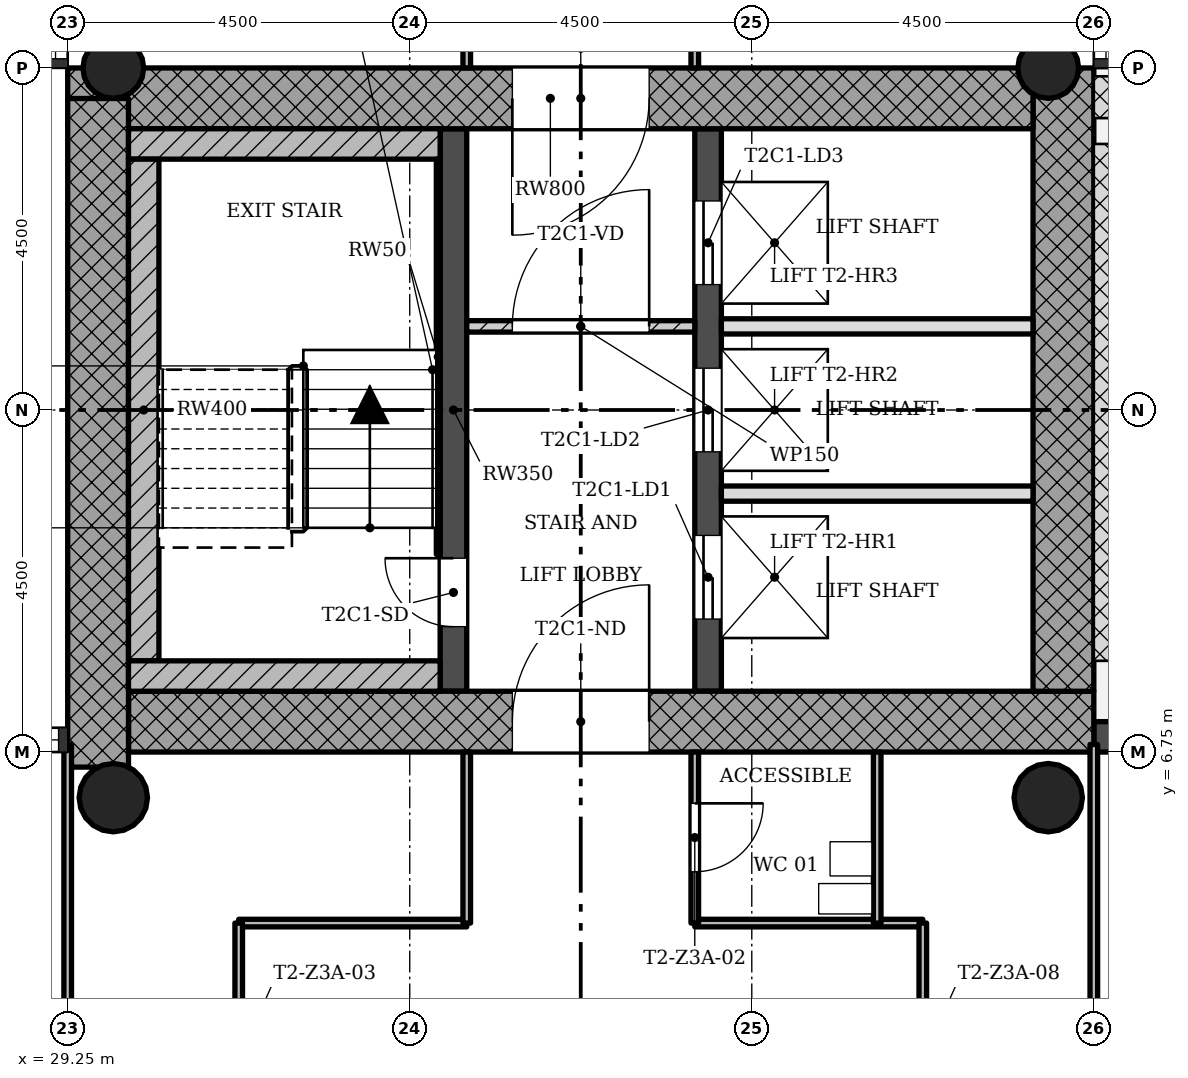
"""IFC4 building model, lengths in metres.
Left out: names, types, materials, properties, quantities, classifications, styles, units other than length and angle.
Written with IfcOpenShell. Run it as: python <this file> out.ifc"""

import sys

from ifc_helpers import new_model, si_unit, direction, frame, frame_2d, origin, origin_2d, place, context, subcontext, project, spatial, rectangle, hollow_circle, extrude, element, fill, save


model = new_model("IFC4")
c1 = context("Model", 3, precision=1e-05, world=origin(), true_north=direction((0.0, 1.0)))
c2 = subcontext(c1, "Body", "Model", "MODEL_VIEW")
j1 = project(units=[si_unit("LENGTHUNIT", "METRE"), si_unit("PLANEANGLEUNIT", "RADIAN")], contexts=[c1])
p1 = place(None, origin())
s1 = spatial("IfcSite", under=j1, at=p1, CompositionType="ELEMENT")
p2 = place(p1, origin())
s2 = spatial("IfcBuilding", under=s1, at=p2, CompositionType="ELEMENT")
p3 = place(p2, frame((0.0, 0.0, 133.7)))
s3 = spatial("IfcBuildingStorey", under=s2, at=p3, CompositionType="ELEMENT", Elevation=133.7)
p4 = place(p3, frame((30.05, 7.15, 0.0), z_axis=(0.0, 0.0, 1.0), x_axis=(1.0, 0.0, 0.0)))
e1 = element("IfcWall", 1, at=p4, inside=s3, PredefinedType="SHEAR", context=c2, shape_type="SweptSolid", body=[
    extrude(rectangle(XDim=12.7, YDim=0.8, at=frame_2d((6.35, 0.0))), origin(), (0.0, 0.0, 1.0), 3.4),
])
p5 = place(p4, frame((5.05, 0.0, 0.0)))
e2 = element("IfcOpeningElement", 2, at=p5, cuts=e1, PredefinedType="OPENING", context=c2, shape_type="SweptSolid", body=[
    extrude(rectangle(XDim=1.8, YDim=2.1, at=frame_2d((0.9, 1.05))), frame((0.0, 0.41, 0.0), z_axis=(0.0, -1.0, 0.0), x_axis=(1.0, 0.0, 0.0)), (0.0, 0.0, 1.0), 0.82),
])
p6 = place(p3, frame((42.35, 7.55, 0.0), z_axis=(0.0, 0.0, 1.0), x_axis=(0.0, 1.0, 0.0)))
e3 = element("IfcWall", 3, at=p6, inside=s3, PredefinedType="SHEAR", context=c2, shape_type="SweptSolid", body=[
    extrude(rectangle(XDim=8.2, YDim=0.8, at=frame_2d((4.1, 0.0))), origin(), (0.0, 0.0, 1.0), 3.4),
])
p7 = place(p3, frame((41.95, 15.35, 0.0), z_axis=(0.0, 0.0, 1.0), x_axis=(-1.0, 0.0, 0.0)))
e4 = element("IfcWall", 4, at=p7, inside=s3, PredefinedType="SHEAR", context=c2, shape_type="SweptSolid", body=[
    extrude(rectangle(XDim=12.7, YDim=0.8, at=frame_2d((6.35, 0.0))), origin(), (0.0, 0.0, 1.0), 3.4),
])
p8 = place(p7, frame((5.05, 0.0, 0.0)))
e5 = element("IfcOpeningElement", 5, at=p8, cuts=e4, PredefinedType="OPENING", context=c2, shape_type="SweptSolid", body=[
    extrude(rectangle(XDim=1.8, YDim=2.1, at=frame_2d((0.9, 1.05))), frame((0.0, 0.41, 0.0), z_axis=(0.0, -1.0, 0.0), x_axis=(1.0, 0.0, 0.0)), (0.0, 0.0, 1.0), 0.82),
])
p9 = place(p3, frame((29.65, 15.348, 0.0), z_axis=(0.0, 0.0, 1.0), x_axis=(0.0, -1.0, 0.0)))
e6 = element("IfcWall", 6, at=p9, inside=s3, PredefinedType="SHEAR", context=c2, shape_type="SweptSolid", body=[
    extrude(rectangle(XDim=8.796, YDim=0.8, at=frame_2d((4.398, 0.0))), origin(), (0.0, 0.0, 1.0), 3.4),
])
p10 = place(p3, frame((34.325, 7.55, 0.0), z_axis=(0.0, 0.0, 1.0), x_axis=(0.0, 1.0, 0.0)))
e7 = element("IfcWall", 7, at=p10, inside=s3, PredefinedType="SHEAR", context=c2, shape_type="SweptSolid", body=[
    extrude(rectangle(XDim=7.4, YDim=0.35, at=frame_2d((3.7, 0.0))), origin(), (0.0, 0.0, 1.0), 3.4),
])
p11 = place(p10, frame((0.85, 0.0, 0.0)))
e8 = element("IfcOpeningElement", 8, at=p11, cuts=e7, PredefinedType="OPENING", context=c2, shape_type="SweptSolid", body=[
    extrude(rectangle(XDim=0.9, YDim=2.1, at=frame_2d((0.45, 1.05))), frame((0.0, 0.185, 0.0), z_axis=(0.0, -1.0, 0.0), x_axis=(1.0, 0.0, 0.0)), (0.0, 0.0, 1.0), 0.37),
])
p12 = place(p3, frame((37.675, 7.55, 0.0), z_axis=(0.0, 0.0, 1.0), x_axis=(0.0, 1.0, 0.0)))
e9 = element("IfcWall", 9, at=p12, inside=s3, PredefinedType="SHEAR", context=c2, shape_type="SweptSolid", body=[
    extrude(rectangle(XDim=7.4, YDim=0.35, at=frame_2d((3.7, 0.0))), origin(), (0.0, 0.0, 1.0), 3.4),
])
p13 = place(p12, frame((0.95, 0.0, 0.0)))
e10 = element("IfcOpeningElement", 10, at=p13, cuts=e9, PredefinedType="OPENING", context=c2, shape_type="SweptSolid", body=[
    extrude(rectangle(XDim=1.1, YDim=2.1, at=frame_2d((0.55, 1.05))), frame((0.0, 0.185, 0.0), z_axis=(0.0, -1.0, 0.0), x_axis=(1.0, 0.0, 0.0)), (0.0, 0.0, 1.0), 0.37),
])
p14 = place(p12, frame((3.15, 0.0, 0.0)))
e11 = element("IfcOpeningElement", 11, at=p14, cuts=e9, PredefinedType="OPENING", context=c2, shape_type="SweptSolid", body=[
    extrude(rectangle(XDim=1.1, YDim=2.1, at=frame_2d((0.55, 1.05))), frame((0.0, 0.185, 0.0), z_axis=(0.0, -1.0, 0.0), x_axis=(1.0, 0.0, 0.0)), (0.0, 0.0, 1.0), 0.37),
])
p15 = place(p12, frame((5.35, 0.0, 0.0)))
e12 = element("IfcOpeningElement", 12, at=p15, cuts=e9, PredefinedType="OPENING", context=c2, shape_type="SweptSolid", body=[
    extrude(rectangle(XDim=1.1, YDim=2.1, at=frame_2d((0.55, 1.05))), frame((0.0, 0.185, 0.0), z_axis=(0.0, -1.0, 0.0), x_axis=(1.0, 0.0, 0.0)), (0.0, 0.0, 1.0), 0.37),
])
for number, where, z_axis, x_axis in (
    (13, (42.15, 15.75, 0.0), (0.0, 0.0, 1.0), (1.0, 0.0, 0.0)),
    (14, (29.85, 15.75, 0.0), (0.0, 0.0, 1.0), (1.0, 0.0, 0.0)),
):
    element("IfcColumn", number, at=place(p3, frame(where, z_axis=z_axis, x_axis=x_axis)), inside=s3, PredefinedType="COLUMN", context=c2, shape_type="SweptSolid", body=[
        extrude(hollow_circle(Radius=0.4, WallThickness=0.028, at=origin_2d()), origin(), (0.0, 0.0, 1.0), 3.4),
    ])
for number, where, z_axis, x_axis in (
    (15, (42.15, 6.15, 0.0), (0.0, 0.0, 1.0), (1.0, 0.0, 0.0)),
    (16, (29.85, 6.15, 0.0), (0.0, 0.0, 1.0), (1.0, 0.0, 0.0)),
):
    element("IfcColumn", number, at=place(p3, frame(where, z_axis=z_axis, x_axis=x_axis)), inside=s3, PredefinedType="COLUMN", context=c2, shape_type="SweptSolid", body=[
        extrude(hollow_circle(Radius=0.45, WallThickness=0.032, at=origin_2d()), origin(), (0.0, 0.0, 1.0), 3.4),
    ])
p16 = place(p3, frame((47.25, 6.95, -0.02), z_axis=(0.0, 0.0, 1.0), x_axis=(-1.0, 0.0, 0.0)))
e17 = element("IfcWall", 17, at=p16, inside=s3, PredefinedType="STANDARD", context=c2, shape_type="SweptSolid", body=[
    extrude(rectangle(XDim=4.5, YDim=0.4, at=frame_2d((2.25, 0.0))), origin(), (0.0, 0.0, 1.0), 3.12),
])
p17 = place(p16, frame((1.35, 0.0, 0.02)))
e18 = element("IfcOpeningElement", 18, at=p17, cuts=e17, PredefinedType="OPENING", context=c2, shape_type="SweptSolid", body=[
    extrude(rectangle(XDim=1.8, YDim=2.1, at=frame_2d((0.9, 1.05))), frame((0.0, 0.21, 0.0), z_axis=(0.0, -1.0, 0.0), x_axis=(1.0, 0.0, 0.0)), (0.0, 0.0, 1.0), 0.42),
])
p18 = place(p3, frame((37.5, 12.35, 0.0), z_axis=(0.0, 0.0, 1.0), x_axis=(-1.0, 0.0, 0.0)))
e19 = element("IfcWall", 19, at=p18, inside=s3, PredefinedType="PARTITIONING", context=c2, shape_type="SweptSolid", body=[
    extrude(rectangle(XDim=3.0, YDim=0.15, at=frame_2d((1.5, 0.0))), origin(), (0.0, 0.0, 1.0), 3.0),
])
p19 = place(p18, frame((0.6, 0.0, 0.0)))
e20 = element("IfcOpeningElement", 20, at=p19, cuts=e19, PredefinedType="OPENING", context=c2, shape_type="SweptSolid", body=[
    extrude(rectangle(XDim=1.8, YDim=2.1, at=frame_2d((0.9, 1.05))), frame((0.0, 0.085, 0.0), z_axis=(0.0, -1.0, 0.0), x_axis=(1.0, 0.0, 0.0)), (0.0, 0.0, 1.0), 0.17),
])
for number, where, z_axis, x_axis in (
    (21, (41.95, 10.15, 0.0), (0.0, 0.0, 1.0), (-1.0, 0.0, 0.0)),
    (22, (41.95, 12.35, 0.0), (0.0, 0.0, 1.0), (-1.0, 0.0, 0.0)),
):
    element("IfcWall", number, at=place(p3, frame(where, z_axis=z_axis, x_axis=x_axis)), inside=s3, PredefinedType="SOLIDWALL", context=c2, shape_type="SweptSolid", body=[
        extrude(rectangle(XDim=4.1, YDim=0.2, at=frame_2d((2.05, 0.0))), origin(), (0.0, 0.0, 1.0), 3.0),
    ])
for number, where, z_axis, x_axis in (
    (23, (40.5, 4.5, 0.0), (0.0, 0.0, 1.0), (-1.0, 0.0, 0.0)),
    (24, (34.5, 4.5, 0.0), (0.0, 0.0, 1.0), (-1.0, 0.0, 0.0)),
):
    element("IfcWall", number, at=place(p3, frame(where, z_axis=z_axis, x_axis=x_axis)), inside=s3, PredefinedType="PARTITIONING", context=c2, shape_type="SweptSolid", body=[
        extrude(rectangle(XDim=3.0, YDim=0.1, at=frame_2d((1.5, 0.0))), origin(), (0.0, 0.0, 1.0), 3.0),
    ])
p20 = place(p3, frame((42.75, 0.9, 0.0), z_axis=(0.0, 0.0, 1.0), x_axis=(0.0, 1.0, 0.0)))
e25 = element("IfcWall", 25, at=p20, inside=s3, PredefinedType="PARTITIONING", context=c2, shape_type="SweptSolid", body=[
    extrude(rectangle(XDim=5.95, YDim=0.1, at=frame_2d((2.975, 0.0))), origin(), (0.0, 0.0, 1.0), 3.0),
])
p21 = place(p3, frame((40.5, 0.9, 0.0), z_axis=(0.0, 0.0, 1.0), x_axis=(0.0, 1.0, 0.0)))
e26 = element("IfcWall", 26, at=p21, inside=s3, PredefinedType="PARTITIONING", context=c2, shape_type="SweptSolid", body=[
    extrude(rectangle(XDim=3.6, YDim=0.1, at=frame_2d((1.8, 0.0))), origin(), (0.0, 0.0, 1.0), 3.0),
])
p22 = place(p21, frame((1.35, 0.0, 0.0)))
e27 = element("IfcOpeningElement", 27, at=p22, cuts=e26, PredefinedType="OPENING", context=c2, shape_type="SweptSolid", body=[
    extrude(rectangle(XDim=0.9, YDim=2.1, at=frame_2d((0.45, 1.05))), frame((0.0, 0.06, 0.0), z_axis=(0.0, -1.0, 0.0), x_axis=(1.0, 0.0, 0.0)), (0.0, 0.0, 1.0), 0.12),
])
p23 = place(p3, frame((39.9, 4.5, 0.0), z_axis=(0.0, 0.0, 1.0), x_axis=(0.0, 1.0, 0.0)))
e28 = element("IfcWall", 28, at=p23, inside=s3, PredefinedType="PARTITIONING", context=c2, shape_type="SweptSolid", body=[
    extrude(rectangle(XDim=2.25, YDim=0.1, at=frame_2d((1.125, 0.0))), origin(), (0.0, 0.0, 1.0), 3.0),
])
p24 = place(p3, frame((37.5, 4.5, 0.0), z_axis=(0.0, 0.0, 1.0), x_axis=(0.0, 1.0, 0.0)))
e29 = element("IfcWall", 29, at=p24, inside=s3, PredefinedType="PARTITIONING", context=c2, shape_type="SweptSolid", body=[
    extrude(rectangle(XDim=2.25, YDim=0.1, at=frame_2d((1.125, 0.0))), origin(), (0.0, 0.0, 1.0), 3.0),
])
p25 = place(p24, frame((0.675, 0.0, 0.0)))
e30 = element("IfcOpeningElement", 30, at=p25, cuts=e29, PredefinedType="OPENING", context=c2, shape_type="SweptSolid", body=[
    extrude(rectangle(XDim=0.9, YDim=2.1, at=frame_2d((0.45, 1.05))), frame((0.0, 0.06, 0.0), z_axis=(0.0, -1.0, 0.0), x_axis=(1.0, 0.0, 0.0)), (0.0, 0.0, 1.0), 0.12),
])
p26 = place(p3, frame((37.5, 15.75, 0.0), z_axis=(0.0, 0.0, 1.0), x_axis=(0.0, 1.0, 0.0)))
e31 = element("IfcWall", 31, at=p26, inside=s3, PredefinedType="PARTITIONING", context=c2, shape_type="SweptSolid", body=[
    extrude(rectangle(XDim=4.5, YDim=0.1, at=frame_2d((2.25, 0.0))), origin(), (0.0, 0.0, 1.0), 3.0),
])
p27 = place(p26, frame((1.8, 0.0, 0.0)))
e32 = element("IfcOpeningElement", 32, at=p27, cuts=e31, PredefinedType="OPENING", context=c2, shape_type="SweptSolid", body=[
    extrude(rectangle(XDim=0.9, YDim=2.1, at=frame_2d((0.45, 1.05))), frame((0.0, 0.06, 0.0), z_axis=(0.0, -1.0, 0.0), x_axis=(1.0, 0.0, 0.0)), (0.0, 0.0, 1.0), 0.12),
])
p28 = place(p3, frame((34.5, 4.5, 0.0), z_axis=(0.0, 0.0, 1.0), x_axis=(0.0, 1.0, 0.0)))
e33 = element("IfcWall", 33, at=p28, inside=s3, PredefinedType="PARTITIONING", context=c2, shape_type="SweptSolid", body=[
    extrude(rectangle(XDim=2.25, YDim=0.1, at=frame_2d((1.125, 0.0))), origin(), (0.0, 0.0, 1.0), 3.0),
])
p29 = place(p3, frame((34.5, 15.75, 0.0), z_axis=(0.0, 0.0, 1.0), x_axis=(0.0, 1.0, 0.0)))
e34 = element("IfcWall", 34, at=p29, inside=s3, PredefinedType="PARTITIONING", context=c2, shape_type="SweptSolid", body=[
    extrude(rectangle(XDim=4.5, YDim=0.1, at=frame_2d((2.25, 0.0))), origin(), (0.0, 0.0, 1.0), 3.0),
])
p30 = place(p29, frame((1.8, 0.0, 0.0)))
e35 = element("IfcOpeningElement", 35, at=p30, cuts=e34, PredefinedType="OPENING", context=c2, shape_type="SweptSolid", body=[
    extrude(rectangle(XDim=0.9, YDim=2.1, at=frame_2d((0.45, 1.05))), frame((0.0, 0.06, 0.0), z_axis=(0.0, -1.0, 0.0), x_axis=(1.0, 0.0, 0.0)), (0.0, 0.0, 1.0), 0.12),
])
p31 = place(p3, frame((31.5, 0.9, 0.0), z_axis=(0.0, 0.0, 1.0), x_axis=(0.0, 1.0, 0.0)))
e36 = element("IfcWall", 36, at=p31, inside=s3, PredefinedType="PARTITIONING", context=c2, shape_type="SweptSolid", body=[
    extrude(rectangle(XDim=3.6, YDim=0.1, at=frame_2d((1.8, 0.0))), origin(), (0.0, 0.0, 1.0), 3.0),
])
p32 = place(p31, frame((1.35, 0.0, 0.0)))
e37 = element("IfcOpeningElement", 37, at=p32, cuts=e36, PredefinedType="OPENING", context=c2, shape_type="SweptSolid", body=[
    extrude(rectangle(XDim=0.9, YDim=2.1, at=frame_2d((0.45, 1.05))), frame((0.0, 0.06, 0.0), z_axis=(0.0, -1.0, 0.0), x_axis=(1.0, 0.0, 0.0)), (0.0, 0.0, 1.0), 0.12),
])
p33 = place(p3, frame((29.25, 0.9, 0.0), z_axis=(0.0, 0.0, 1.0), x_axis=(0.0, 1.0, 0.0)))
e38 = element("IfcWall", 38, at=p33, inside=s3, PredefinedType="PARTITIONING", context=c2, shape_type="SweptSolid", body=[
    extrude(rectangle(XDim=5.95, YDim=0.1, at=frame_2d((2.975, 0.0))), origin(), (0.0, 0.0, 1.0), 3.0),
])
p34 = place(p3, frame((34.15, 14.75, 0.0), z_axis=(0.0, 0.0, 1.0), x_axis=(-1.0, 0.0, 0.0)))
e39 = element("IfcWall", 39, at=p34, inside=s3, PredefinedType="SHEAR", context=c2, shape_type="SweptSolid", body=[
    extrude(rectangle(XDim=4.1, YDim=0.4, at=frame_2d((2.05, 0.0))), origin(), (0.0, 0.0, 1.0), 3.4),
])
p35 = place(p3, frame((30.25, 7.95, 0.0), z_axis=(0.0, 0.0, 1.0), x_axis=(0.0, 1.0, 0.0)))
e40 = element("IfcWall", 40, at=p35, inside=s3, PredefinedType="SHEAR", context=c2, shape_type="SweptSolid", body=[
    extrude(rectangle(XDim=6.6, YDim=0.4, at=frame_2d((3.3, 0.0))), origin(), (0.0, 0.0, 1.0), 3.4),
])
p36 = place(p3, frame((34.15, 7.75, 0.0), z_axis=(0.0, 0.0, 1.0), x_axis=(-1.0, 0.0, 0.0)))
e41 = element("IfcWall", 41, at=p36, inside=s3, PredefinedType="SHEAR", context=c2, shape_type="SweptSolid", body=[
    extrude(rectangle(XDim=4.1, YDim=0.4, at=frame_2d((2.05, 0.0))), origin(), (0.0, 0.0, 1.0), 3.4),
])
p37 = place(p3, frame((34.125, 9.35, 0.0), z_axis=(0.0, 0.0, 1.0), x_axis=(0.0, 1.0, 0.0)))
e42 = element("IfcWall", 42, at=p37, inside=s3, PredefinedType="SHEAR", context=c2, shape_type="SweptSolid", body=[
    extrude(rectangle(XDim=5.2, YDim=0.05, at=frame_2d((2.6, 0.0))), origin(), (0.0, 0.0, 1.0), 3.4),
])
p38 = place(p19, origin())
e43 = element("IfcDoor", 43, at=p38, inside=s3, OperationType="SINGLE_SWING_LEFT", PredefinedType="DOOR", context=c2, shape_type="SweptSolid", body=[
    extrude(rectangle(XDim=1.8, YDim=2.1, at=frame_2d((0.9, 1.05))), frame((0.0, 0.025, 0.0), z_axis=(0.0, -1.0, 0.0), x_axis=(1.0, 0.0, 0.0)), (0.0, 0.0, 1.0), 0.05),
])
fill(e20, e43)
p39 = place(p25, origin())
e44 = element("IfcDoor", 44, at=p39, inside=s3, OperationType="SINGLE_SWING_RIGHT", PredefinedType="DOOR", context=c2, shape_type="SweptSolid", body=[
    extrude(rectangle(XDim=0.9, YDim=2.1, at=frame_2d((0.45, 1.05))), frame((0.0, 0.025, 0.0), z_axis=(0.0, -1.0, 0.0), x_axis=(1.0, 0.0, 0.0)), (0.0, 0.0, 1.0), 0.05),
])
fill(e30, e44)
p40 = place(p11, origin())
e45 = element("IfcDoor", 45, at=p40, inside=s3, OperationType="SINGLE_SWING_LEFT", PredefinedType="DOOR", context=c2, shape_type="SweptSolid", body=[
    extrude(rectangle(XDim=0.9, YDim=2.1, at=frame_2d((0.45, 1.05))), frame((0.0, 0.025, 0.0), z_axis=(0.0, -1.0, 0.0), x_axis=(1.0, 0.0, 0.0)), (0.0, 0.0, 1.0), 0.05),
])
fill(e8, e45)
p41 = place(p13, origin())
e46 = element("IfcDoor", 46, at=p41, inside=s3, OperationType="SLIDING_TO_LEFT", PredefinedType="DOOR", context=c2, shape_type="SweptSolid", body=[
    extrude(rectangle(XDim=1.1, YDim=2.1, at=frame_2d((0.55, 1.05))), frame((0.0, 0.025, 0.0), z_axis=(0.0, -1.0, 0.0), x_axis=(1.0, 0.0, 0.0)), (0.0, 0.0, 1.0), 0.05),
])
fill(e10, e46)
p42 = place(p14, origin())
e47 = element("IfcDoor", 47, at=p42, inside=s3, OperationType="SLIDING_TO_LEFT", PredefinedType="DOOR", context=c2, shape_type="SweptSolid", body=[
    extrude(rectangle(XDim=1.1, YDim=2.1, at=frame_2d((0.55, 1.05))), frame((0.0, 0.025, 0.0), z_axis=(0.0, -1.0, 0.0), x_axis=(1.0, 0.0, 0.0)), (0.0, 0.0, 1.0), 0.05),
])
fill(e11, e47)
p43 = place(p15, origin())
e48 = element("IfcDoor", 48, at=p43, inside=s3, OperationType="SLIDING_TO_LEFT", PredefinedType="DOOR", context=c2, shape_type="SweptSolid", body=[
    extrude(rectangle(XDim=1.1, YDim=2.1, at=frame_2d((0.55, 1.05))), frame((0.0, 0.025, 0.0), z_axis=(0.0, -1.0, 0.0), x_axis=(1.0, 0.0, 0.0)), (0.0, 0.0, 1.0), 0.05),
])
fill(e12, e48)
p44 = place(p5, origin())
e49 = element("IfcDoor", 49, at=p44, inside=s3, OperationType="SINGLE_SWING_LEFT", PredefinedType="DOOR", context=c2, shape_type="SweptSolid", body=[
    extrude(rectangle(XDim=1.8, YDim=2.1, at=frame_2d((0.9, 1.05))), frame((0.0, 0.025, 0.0), z_axis=(0.0, -1.0, 0.0), x_axis=(1.0, 0.0, 0.0)), (0.0, 0.0, 1.0), 0.05),
])
fill(e2, e49)
p45 = place(p8, origin())
e50 = element("IfcDoor", 50, at=p45, inside=s3, OperationType="SINGLE_SWING_LEFT", PredefinedType="DOOR", context=c2, shape_type="SweptSolid", body=[
    extrude(rectangle(XDim=1.8, YDim=2.1, at=frame_2d((0.9, 1.05))), frame((0.0, 0.025, 0.0), z_axis=(0.0, -1.0, 0.0), x_axis=(1.0, 0.0, 0.0)), (0.0, 0.0, 1.0), 0.05),
])
fill(e5, e50)
save(model, sys.argv[1])
